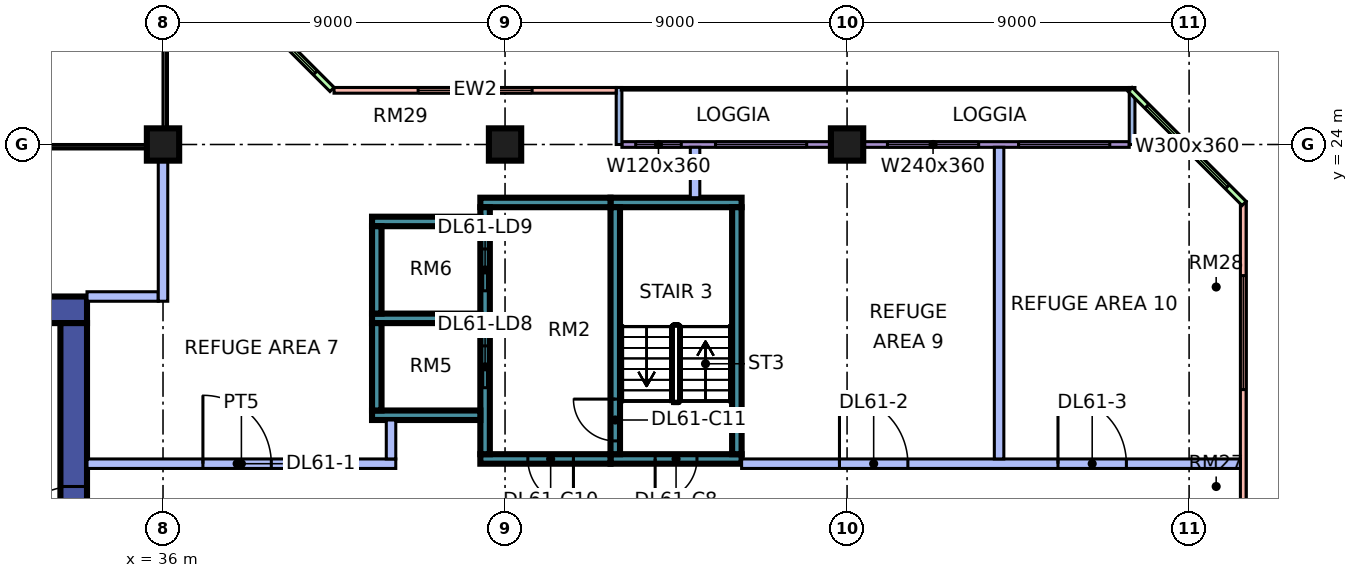
"""IFC4 building model, lengths in metres.
Left out: names, types, materials, properties, quantities, classifications, styles, units other than length and angle.
Written with IfcOpenShell. Run it as: python <this file> out.ifc"""

import sys

from ifc_helpers import new_model, si_unit, direction, frame, frame_2d, origin, origin_2d, place, context, subcontext, project, spatial, rectangle, extrude, element, fill, save


model = new_model("IFC4")
c1 = context("Model", 3, precision=1e-05, world=origin(), true_north=direction((0.0, 1.0)))
c2 = subcontext(c1, "Body", "Model", "MODEL_VIEW")
j1 = project(units=[si_unit("LENGTHUNIT", "METRE"), si_unit("PLANEANGLEUNIT", "RADIAN")], contexts=[c1])
p1 = place(None, origin())
s1 = spatial("IfcSite", under=j1, at=p1, CompositionType="ELEMENT")
p2 = place(p1, origin())
s2 = spatial("IfcBuilding", under=s1, at=p2, CompositionType="ELEMENT")
p3 = place(p2, frame((0.0, 0.0, 256.65)))
s3 = spatial("IfcBuildingStorey", under=s2, at=p3, CompositionType="ELEMENT", Elevation=256.65)
for number, where, z_axis, x_axis in (
    (1, (36.0, 24.0, 0.0), (0.0, 0.0, 1.0), (1.0, 0.0, 0.0)),
    (2, (45.0, 24.0, 0.0), (0.0, 0.0, 1.0), (1.0, 0.0, 0.0)),
    (3, (54.0, 24.0, 0.0), (0.0, 0.0, 1.0), (1.0, 0.0, 0.0)),
):
    element("IfcColumn", number, at=place(p3, frame(where, z_axis=z_axis, x_axis=x_axis)), inside=s3, PredefinedType="COLUMN", context=c2, shape_type="SweptSolid", body=[
        extrude(rectangle(XDim=0.85, YDim=0.85, at=origin_2d()), origin(), (0.0, 0.0, 1.0), 5.5),
    ])
p4 = place(p3, frame((9.0, 19.65, 0.0), z_axis=(0.0, 0.0, 1.0), x_axis=(1.0, 0.0, 0.0)))
e4 = element("IfcWall", 4, at=p4, inside=s3, PredefinedType="SHEAR", context=c2, shape_type="SweptSolid", body=[
    extrude(rectangle(XDim=25.0, YDim=0.7, at=frame_2d((12.5, 0.0))), origin(), (0.0, 0.0, 1.0), 5.5),
])
p5 = place(p4, frame((19.1, 0.0, 0.0)))
e5 = element("IfcOpeningElement", 5, at=p5, cuts=e4, PredefinedType="OPENING", context=c2, shape_type="SweptSolid", body=[
    extrude(rectangle(XDim=1.8, YDim=2.4, at=frame_2d((0.9, 1.2))), frame((0.0, 0.36, 0.0), z_axis=(0.0, -1.0, 0.0), x_axis=(1.0, 0.0, 0.0)), (0.0, 0.0, 1.0), 0.72),
])
p6 = place(p3, frame((33.65, 7.7, 0.0), z_axis=(0.0, 0.0, 1.0), x_axis=(0.0, 1.0, 0.0)))
e6 = element("IfcWall", 6, at=p6, inside=s3, PredefinedType="SHEAR", context=c2, shape_type="SweptSolid", body=[
    extrude(rectangle(XDim=11.6, YDim=0.7, at=frame_2d((5.8, 0.0))), origin(), (0.0, 0.0, 1.0), 5.5),
])
p7 = place(p6, frame((5.5, 0.0, 0.0)))
e7 = element("IfcOpeningElement", 7, at=p7, cuts=e6, PredefinedType="OPENING", context=c2, shape_type="SweptSolid", body=[
    extrude(rectangle(XDim=1.8, YDim=2.4, at=frame_2d((0.9, 1.2))), frame((0.0, 0.36, 0.0), z_axis=(0.0, -1.0, 0.0), x_axis=(1.0, 0.0, 0.0)), (0.0, 0.0, 1.0), 0.72),
])
p8 = place(p3, frame((47.775, 15.725, 0.0), z_axis=(0.0, 0.0, 1.0), x_axis=(1.0, 0.0, 0.0)))
e8 = element("IfcWall", 8, at=p8, inside=s3, PredefinedType="SHEAR", context=c2, shape_type="SweptSolid", body=[
    extrude(rectangle(XDim=3.45, YDim=0.25, at=frame_2d((1.725, 0.0))), origin(), (0.0, 0.0, 1.0), 5.5),
])
p9 = place(p8, frame((1.175, 0.0, 0.0)))
e9 = element("IfcOpeningElement", 9, at=p9, cuts=e8, PredefinedType="OPENING", context=c2, shape_type="SweptSolid", body=[
    extrude(rectangle(XDim=1.1, YDim=2.2, at=frame_2d((0.55, 1.1))), frame((0.0, 0.135, 0.0), z_axis=(0.0, -1.0, 0.0), x_axis=(1.0, 0.0, 0.0)), (0.0, 0.0, 1.0), 0.27),
])
p10 = place(p3, frame((47.775, 22.475, 0.0), z_axis=(0.0, 0.0, 1.0), x_axis=(1.0, 0.0, 0.0)))
e10 = element("IfcWall", 10, at=p10, inside=s3, PredefinedType="SHEAR", context=c2, shape_type="SweptSolid", body=[
    extrude(rectangle(XDim=3.45, YDim=0.25, at=frame_2d((1.725, 0.0))), origin(), (0.0, 0.0, 1.0), 5.5),
])
p11 = place(p3, frame((47.9, 15.85, 0.0), z_axis=(0.0, 0.0, 1.0), x_axis=(0.0, 1.0, 0.0)))
e11 = element("IfcWall", 11, at=p11, inside=s3, PredefinedType="SHEAR", context=c2, shape_type="SweptSolid", body=[
    extrude(rectangle(XDim=6.5, YDim=0.25, at=frame_2d((3.25, 0.0))), origin(), (0.0, 0.0, 1.0), 5.5),
])
p12 = place(p11, frame((0.35, 0.0, 0.0)))
e12 = element("IfcOpeningElement", 12, at=p12, cuts=e11, PredefinedType="OPENING", context=c2, shape_type="SweptSolid", body=[
    extrude(rectangle(XDim=1.1, YDim=2.2, at=frame_2d((0.55, 1.1))), frame((0.0, 0.135, 0.0), z_axis=(0.0, -1.0, 0.0), x_axis=(1.0, 0.0, 0.0)), (0.0, 0.0, 1.0), 0.27),
])
p13 = place(p3, frame((51.1, 15.85, 0.0), z_axis=(0.0, 0.0, 1.0), x_axis=(0.0, 1.0, 0.0)))
e13 = element("IfcWall", 13, at=p13, inside=s3, PredefinedType="SHEAR", context=c2, shape_type="SweptSolid", body=[
    extrude(rectangle(XDim=6.5, YDim=0.25, at=frame_2d((3.25, 0.0))), origin(), (0.0, 0.0, 1.0), 5.5),
])
p14 = place(p3, frame((44.35, 15.725, 0.0), z_axis=(0.0, 0.0, 1.0), x_axis=(1.0, 0.0, 0.0)))
e14 = element("IfcWall", 14, at=p14, inside=s3, PredefinedType="SHEAR", context=c2, shape_type="SweptSolid", body=[
    extrude(rectangle(XDim=3.425, YDim=0.25, at=frame_2d((1.712, 0.0))), origin(), (0.0, 0.0, 1.0), 5.5),
])
p15 = place(p14, frame((1.25, 0.0, 0.0)))
e15 = element("IfcOpeningElement", 15, at=p15, cuts=e14, PredefinedType="OPENING", context=c2, shape_type="SweptSolid", body=[
    extrude(rectangle(XDim=1.2, YDim=2.2, at=frame_2d((0.6, 1.1))), frame((0.0, 0.135, 0.0), z_axis=(0.0, -1.0, 0.0), x_axis=(1.0, 0.0, 0.0)), (0.0, 0.0, 1.0), 0.27),
])
p16 = place(p3, frame((44.35, 22.475, 0.0), z_axis=(0.0, 0.0, 1.0), x_axis=(1.0, 0.0, 0.0)))
e16 = element("IfcWall", 16, at=p16, inside=s3, PredefinedType="SHEAR", context=c2, shape_type="SweptSolid", body=[
    extrude(rectangle(XDim=3.425, YDim=0.25, at=frame_2d((1.712, 0.0))), origin(), (0.0, 0.0, 1.0), 5.5),
])
p17 = place(p3, frame((44.475, 15.85, 0.0), z_axis=(0.0, 0.0, 1.0), x_axis=(0.0, 1.0, 0.0)))
e17 = element("IfcWall", 17, at=p17, inside=s3, PredefinedType="SHEAR", context=c2, shape_type="SweptSolid", body=[
    extrude(rectangle(XDim=6.5, YDim=0.25, at=frame_2d((3.25, 0.0))), origin(), (0.0, 0.0, 1.0), 5.5),
])
p18 = place(p17, frame((1.75, 0.0, 0.0)))
e18 = element("IfcOpeningElement", 18, at=p18, cuts=e17, PredefinedType="OPENING", context=c2, shape_type="SweptSolid", body=[
    extrude(rectangle(XDim=1.1, YDim=2.2, at=frame_2d((0.55, 1.1))), frame((0.0, 0.135, 0.0), z_axis=(0.0, -1.0, 0.0), x_axis=(1.0, 0.0, 0.0)), (0.0, 0.0, 1.0), 0.27),
])
p19 = place(p17, frame((4.3, 0.0, 0.0)))
e19 = element("IfcOpeningElement", 19, at=p19, cuts=e17, PredefinedType="OPENING", context=c2, shape_type="SweptSolid", body=[
    extrude(rectangle(XDim=1.1, YDim=2.2, at=frame_2d((0.55, 1.1))), frame((0.0, 0.135, 0.0), z_axis=(0.0, -1.0, 0.0), x_axis=(1.0, 0.0, 0.0)), (0.0, 0.0, 1.0), 0.27),
])
for number, where, z_axis, x_axis in (
    (20, (41.5, 16.875, 0.0), (0.0, 0.0, 1.0), (1.0, 0.0, 0.0)),
    (21, (41.5, 19.425, 0.0), (0.0, 0.0, 1.0), (1.0, 0.0, 0.0)),
    (22, (41.5, 21.975, 0.0), (0.0, 0.0, 1.0), (1.0, 0.0, 0.0)),
):
    element("IfcWall", number, at=place(p3, frame(where, z_axis=z_axis, x_axis=x_axis)), inside=s3, PredefinedType="SHEAR", context=c2, shape_type="SweptSolid", body=[
        extrude(rectangle(XDim=2.85, YDim=0.25, at=frame_2d((1.425, 0.0))), origin(), (0.0, 0.0, 1.0), 5.5),
    ])
for number, where, z_axis, x_axis in (
    (23, (41.625, 17.0, 0.0), (0.0, 0.0, 1.0), (0.0, 1.0, 0.0)),
    (24, (41.625, 19.55, 0.0), (0.0, 0.0, 1.0), (0.0, 1.0, 0.0)),
):
    element("IfcWall", number, at=place(p3, frame(where, z_axis=z_axis, x_axis=x_axis)), inside=s3, PredefinedType="SHEAR", context=c2, shape_type="SweptSolid", body=[
        extrude(rectangle(XDim=2.3, YDim=0.25, at=frame_2d((1.15, 0.0))), origin(), (0.0, 0.0, 1.0), 5.5),
    ])
p20 = place(p3, frame((61.425, 24.0, 0.0), z_axis=(0.0, 0.0, 1.0), x_axis=(-1.0, 0.0, 0.0)))
e25 = element("IfcWall", 25, at=p20, inside=s3, PredefinedType="SOLIDWALL", context=c2, shape_type="SweptSolid", body=[
    extrude(rectangle(XDim=13.35, YDim=0.15, at=frame_2d((6.675, 0.0))), origin(), (0.0, 0.0, 1.0), 5.05),
])
p21 = place(p20, frame((0.512, 0.0, 0.45)))
e26 = element("IfcOpeningElement", 26, at=p21, cuts=e25, PredefinedType="OPENING", context=c2, shape_type="SweptSolid", body=[
    extrude(rectangle(XDim=2.4, YDim=3.6, at=frame_2d((1.2, 1.8))), frame((0.0, 0.085, 0.0), z_axis=(0.0, -1.0, 0.0), x_axis=(1.0, 0.0, 0.0)), (0.0, 0.0, 1.0), 0.17),
])
p22 = place(p20, frame((3.962, 0.0, 0.45)))
e27 = element("IfcOpeningElement", 27, at=p22, cuts=e25, PredefinedType="OPENING", context=c2, shape_type="SweptSolid", body=[
    extrude(rectangle(XDim=2.4, YDim=3.6, at=frame_2d((1.2, 1.8))), frame((0.0, 0.085, 0.0), z_axis=(0.0, -1.0, 0.0), x_axis=(1.0, 0.0, 0.0)), (0.0, 0.0, 1.0), 0.17),
])
p23 = place(p20, frame((8.488, 0.0, 0.45)))
e28 = element("IfcOpeningElement", 28, at=p23, cuts=e25, PredefinedType="OPENING", context=c2, shape_type="SweptSolid", body=[
    extrude(rectangle(XDim=2.4, YDim=3.6, at=frame_2d((1.2, 1.8))), frame((0.0, 0.085, 0.0), z_axis=(0.0, -1.0, 0.0), x_axis=(1.0, 0.0, 0.0)), (0.0, 0.0, 1.0), 0.17),
])
p24 = place(p20, frame((11.788, 0.0, 0.45)))
e29 = element("IfcOpeningElement", 29, at=p24, cuts=e25, PredefinedType="OPENING", context=c2, shape_type="SweptSolid", body=[
    extrude(rectangle(XDim=1.2, YDim=3.6, at=frame_2d((0.6, 1.8))), frame((0.0, 0.085, 0.0), z_axis=(0.0, -1.0, 0.0), x_axis=(1.0, 0.0, 0.0)), (0.0, 0.0, 1.0), 0.17),
])
for number, where, z_axis, x_axis in (
    (30, (61.5, 25.5, 0.0), (0.0, 0.0, 1.0), (0.0, -1.0, 0.0)),
    (31, (48.0, 25.5, 0.0), (0.0, 0.0, 1.0), (0.0, -1.0, 0.0)),
):
    element("IfcWall", number, at=place(p3, frame(where, z_axis=z_axis, x_axis=x_axis)), inside=s3, PredefinedType="SOLIDWALL", context=c2, shape_type="SweptSolid", body=[
        extrude(rectangle(XDim=1.5, YDim=0.15, at=frame_2d((0.75, 0.0))), origin(), (0.0, 0.0, 1.0), 5.05),
    ])
p25 = place(p3, frame((47.925, 25.425, 0.0), z_axis=(0.0, 0.0, 1.0), x_axis=(-1.0, 0.0, 0.0)))
e32 = element("IfcWall", 32, at=p25, inside=s3, PredefinedType="SOLIDWALL", context=c2, shape_type="SweptSolid", body=[
    extrude(rectangle(XDim=7.425, YDim=0.15, at=frame_2d((3.712, 0.0))), origin(), (0.0, 0.0, 1.0), 5.05),
])
p26 = place(p25, frame((2.212, 0.0, 0.45)))
e33 = element("IfcOpeningElement", 33, at=p26, cuts=e32, PredefinedType="OPENING", context=c2, shape_type="SweptSolid", body=[
    extrude(rectangle(XDim=3.0, YDim=3.6, at=frame_2d((1.5, 1.8))), frame((0.0, 0.085, 0.0), z_axis=(0.0, -1.0, 0.0), x_axis=(1.0, 0.0, 0.0)), (0.0, 0.0, 1.0), 0.17),
])
p27 = place(p3, frame((40.447, 25.447, 0.0), z_axis=(0.0, 0.0, 1.0), x_axis=(-0.707106781187, 0.707106781187, 0.0)))
e34 = element("IfcWall", 34, at=p27, inside=s3, PredefinedType="SOLIDWALL", context=c2, shape_type="SweptSolid", body=[
    extrude(rectangle(XDim=4.243, YDim=0.15, at=frame_2d((2.121, 0.0))), origin(), (0.0, 0.0, 1.0), 5.05),
])
p28 = place(p27, frame((0.621, 0.0, 0.45)))
e35 = element("IfcOpeningElement", 35, at=p28, cuts=e34, PredefinedType="OPENING", context=c2, shape_type="SweptSolid", body=[
    extrude(rectangle(XDim=3.0, YDim=3.6, at=frame_2d((1.5, 1.8))), frame((0.0, 0.085, 0.0), z_axis=(0.0, -1.0, 0.0), x_axis=(1.0, 0.0, 0.0)), (0.0, 0.0, 1.0), 0.17),
])
p29 = place(p3, frame((64.425, 12.075, 0.0), z_axis=(0.0, 0.0, 1.0), x_axis=(0.0, 1.0, 0.0)))
e36 = element("IfcWall", 36, at=p29, inside=s3, PredefinedType="SOLIDWALL", context=c2, shape_type="SweptSolid", body=[
    extrude(rectangle(XDim=10.425, YDim=0.15, at=frame_2d((5.212, 0.0))), origin(), (0.0, 0.0, 1.0), 5.05),
])
p30 = place(p29, frame((5.475, 0.0, 0.45)))
e37 = element("IfcOpeningElement", 37, at=p30, cuts=e36, PredefinedType="OPENING", context=c2, shape_type="SweptSolid", body=[
    extrude(rectangle(XDim=3.0, YDim=3.6, at=frame_2d((1.5, 1.8))), frame((0.0, 0.085, 0.0), z_axis=(0.0, -1.0, 0.0), x_axis=(1.0, 0.0, 0.0)), (0.0, 0.0, 1.0), 0.17),
])
p31 = place(p3, frame((64.447, 22.447, 0.0), z_axis=(0.0, 0.0, 1.0), x_axis=(-0.707106781187, 0.707106781187, 0.0)))
e38 = element("IfcWall", 38, at=p31, inside=s3, PredefinedType="SOLIDWALL", context=c2, shape_type="SweptSolid", body=[
    extrude(rectangle(XDim=4.243, YDim=0.15, at=frame_2d((2.121, 0.0))), origin(), (0.0, 0.0, 1.0), 5.05),
])
p32 = place(p31, frame((0.621, 0.0, 0.45)))
e39 = element("IfcOpeningElement", 39, at=p32, cuts=e38, PredefinedType="OPENING", context=c2, shape_type="SweptSolid", body=[
    extrude(rectangle(XDim=3.0, YDim=3.6, at=frame_2d((1.5, 1.8))), frame((0.0, 0.085, 0.0), z_axis=(0.0, -1.0, 0.0), x_axis=(1.0, 0.0, 0.0)), (0.0, 0.0, 1.0), 0.17),
])
p33 = place(p3, frame((34.0, 15.6, 0.0), z_axis=(0.0, 0.0, 1.0), x_axis=(1.0, 0.0, 0.0)))
e40 = element("IfcWall", 40, at=p33, inside=s3, PredefinedType="PARTITIONING", context=c2, shape_type="SweptSolid", body=[
    extrude(rectangle(XDim=8.125, YDim=0.25, at=frame_2d((4.062, 0.0))), origin(), (0.0, 0.0, 1.0), 5.05),
])
p34 = place(p33, frame((3.05, 0.0, 0.0)))
e41 = element("IfcOpeningElement", 41, at=p34, cuts=e40, PredefinedType="OPENING", context=c2, shape_type="SweptSolid", body=[
    extrude(rectangle(XDim=1.8, YDim=2.1, at=frame_2d((0.9, 1.05))), frame((0.0, 0.135, 0.0), z_axis=(0.0, -1.0, 0.0), x_axis=(1.0, 0.0, 0.0)), (0.0, 0.0, 1.0), 0.27),
])
p35 = place(p3, frame((34.0, 20.0, 0.0), z_axis=(0.0, 0.0, 1.0), x_axis=(1.0, 0.0, 0.0)))
e42 = element("IfcWall", 42, at=p35, inside=s3, PredefinedType="PARTITIONING", context=c2, shape_type="SweptSolid", body=[
    extrude(rectangle(XDim=1.875, YDim=0.25, at=frame_2d((0.938, 0.0))), origin(), (0.0, 0.0, 1.0), 5.05),
])
p36 = place(p3, frame((36.0, 19.875, 0.0), z_axis=(0.0, 0.0, 1.0), x_axis=(0.0, 1.0, 0.0)))
e43 = element("IfcWall", 43, at=p36, inside=s3, PredefinedType="PARTITIONING", context=c2, shape_type="SweptSolid", body=[
    extrude(rectangle(XDim=4.125, YDim=0.25, at=frame_2d((2.062, 0.0))), origin(), (0.0, 0.0, 1.0), 5.05),
])
p37 = place(p3, frame((42.0, 15.725, 0.0), z_axis=(0.0, 0.0, 1.0), x_axis=(0.0, 1.0, 0.0)))
e44 = element("IfcWall", 44, at=p37, inside=s3, PredefinedType="PARTITIONING", context=c2, shape_type="SweptSolid", body=[
    extrude(rectangle(XDim=1.025, YDim=0.25, at=frame_2d((0.512, 0.0))), origin(), (0.0, 0.0, 1.0), 5.05),
])
p38 = place(p3, frame((50.0, 22.6, 0.0), z_axis=(0.0, 0.0, 1.0), x_axis=(0.0, 1.0, 0.0)))
e45 = element("IfcWall", 45, at=p38, inside=s3, PredefinedType="PARTITIONING", context=c2, shape_type="SweptSolid", body=[
    extrude(rectangle(XDim=1.326, YDim=0.25, at=frame_2d((0.663, 0.0))), origin(), (0.0, 0.0, 1.0), 5.05),
])
p39 = place(p3, frame((51.225, 15.6, 0.0), z_axis=(0.0, 0.0, 1.0), x_axis=(1.0, 0.0, 0.0)))
e46 = element("IfcWall", 46, at=p39, inside=s3, PredefinedType="PARTITIONING", context=c2, shape_type="SweptSolid", body=[
    extrude(rectangle(XDim=13.125, YDim=0.25, at=frame_2d((6.562, 0.0))), origin(), (0.0, 0.0, 1.0), 5.05),
])
p40 = place(p39, frame((2.575, 0.0, 0.0)))
e47 = element("IfcOpeningElement", 47, at=p40, cuts=e46, PredefinedType="OPENING", context=c2, shape_type="SweptSolid", body=[
    extrude(rectangle(XDim=1.8, YDim=2.1, at=frame_2d((0.9, 1.05))), frame((0.0, 0.135, 0.0), z_axis=(0.0, -1.0, 0.0), x_axis=(1.0, 0.0, 0.0)), (0.0, 0.0, 1.0), 0.27),
])
p41 = place(p39, frame((8.325, 0.0, 0.0)))
e48 = element("IfcOpeningElement", 48, at=p41, cuts=e46, PredefinedType="OPENING", context=c2, shape_type="SweptSolid", body=[
    extrude(rectangle(XDim=1.8, YDim=2.1, at=frame_2d((0.9, 1.05))), frame((0.0, 0.135, 0.0), z_axis=(0.0, -1.0, 0.0), x_axis=(1.0, 0.0, 0.0)), (0.0, 0.0, 1.0), 0.27),
])
p42 = place(p3, frame((58.0, 15.725, 0.0), z_axis=(0.0, 0.0, 1.0), x_axis=(0.0, 1.0, 0.0)))
e49 = element("IfcWall", 49, at=p42, inside=s3, PredefinedType="PARTITIONING", context=c2, shape_type="SweptSolid", body=[
    extrude(rectangle(XDim=8.201, YDim=0.25, at=frame_2d((4.101, 0.0))), origin(), (0.0, 0.0, 1.0), 5.05),
])
p43 = place(p21, origin())
e50 = element("IfcWindow", 50, at=p43, inside=s3, PartitioningType="SINGLE_PANEL", PredefinedType="WINDOW", context=c2, shape_type="SweptSolid", body=[
    extrude(rectangle(XDim=2.4, YDim=3.6, at=frame_2d((1.2, 1.8))), frame((0.0, 0.03, 0.0), z_axis=(0.0, -1.0, 0.0), x_axis=(1.0, 0.0, 0.0)), (0.0, 0.0, 1.0), 0.06),
])
fill(e26, e50)
p44 = place(p22, origin())
e51 = element("IfcWindow", 51, at=p44, inside=s3, PartitioningType="SINGLE_PANEL", PredefinedType="WINDOW", context=c2, shape_type="SweptSolid", body=[
    extrude(rectangle(XDim=2.4, YDim=3.6, at=frame_2d((1.2, 1.8))), frame((0.0, 0.03, 0.0), z_axis=(0.0, -1.0, 0.0), x_axis=(1.0, 0.0, 0.0)), (0.0, 0.0, 1.0), 0.06),
])
fill(e27, e51)
p45 = place(p23, origin())
e52 = element("IfcWindow", 52, at=p45, inside=s3, PartitioningType="SINGLE_PANEL", PredefinedType="WINDOW", context=c2, shape_type="SweptSolid", body=[
    extrude(rectangle(XDim=2.4, YDim=3.6, at=frame_2d((1.2, 1.8))), frame((0.0, 0.03, 0.0), z_axis=(0.0, -1.0, 0.0), x_axis=(1.0, 0.0, 0.0)), (0.0, 0.0, 1.0), 0.06),
])
fill(e28, e52)
p46 = place(p24, origin())
e53 = element("IfcWindow", 53, at=p46, inside=s3, PartitioningType="SINGLE_PANEL", PredefinedType="WINDOW", context=c2, shape_type="SweptSolid", body=[
    extrude(rectangle(XDim=1.2, YDim=3.6, at=frame_2d((0.6, 1.8))), frame((0.0, 0.03, 0.0), z_axis=(0.0, -1.0, 0.0), x_axis=(1.0, 0.0, 0.0)), (0.0, 0.0, 1.0), 0.06),
])
fill(e29, e53)
p47 = place(p26, origin())
e54 = element("IfcWindow", 54, at=p47, inside=s3, PartitioningType="SINGLE_PANEL", PredefinedType="WINDOW", context=c2, shape_type="SweptSolid", body=[
    extrude(rectangle(XDim=3.0, YDim=3.6, at=frame_2d((1.5, 1.8))), frame((0.0, 0.03, 0.0), z_axis=(0.0, -1.0, 0.0), x_axis=(1.0, 0.0, 0.0)), (0.0, 0.0, 1.0), 0.06),
])
fill(e33, e54)
p48 = place(p28, origin())
e55 = element("IfcWindow", 55, at=p48, inside=s3, PartitioningType="SINGLE_PANEL", PredefinedType="WINDOW", context=c2, shape_type="SweptSolid", body=[
    extrude(rectangle(XDim=3.0, YDim=3.6, at=frame_2d((1.5, 1.8))), frame((0.0, 0.03, 0.0), z_axis=(0.0, -1.0, 0.0), x_axis=(1.0, 0.0, 0.0)), (0.0, 0.0, 1.0), 0.06),
])
fill(e35, e55)
p49 = place(p30, origin())
e56 = element("IfcWindow", 56, at=p49, inside=s3, PartitioningType="SINGLE_PANEL", PredefinedType="WINDOW", context=c2, shape_type="SweptSolid", body=[
    extrude(rectangle(XDim=3.0, YDim=3.6, at=frame_2d((1.5, 1.8))), frame((0.0, 0.03, 0.0), z_axis=(0.0, -1.0, 0.0), x_axis=(1.0, 0.0, 0.0)), (0.0, 0.0, 1.0), 0.06),
])
fill(e37, e56)
p50 = place(p32, origin())
e57 = element("IfcWindow", 57, at=p50, inside=s3, PartitioningType="SINGLE_PANEL", PredefinedType="WINDOW", context=c2, shape_type="SweptSolid", body=[
    extrude(rectangle(XDim=3.0, YDim=3.6, at=frame_2d((1.5, 1.8))), frame((0.0, 0.03, 0.0), z_axis=(0.0, -1.0, 0.0), x_axis=(1.0, 0.0, 0.0)), (0.0, 0.0, 1.0), 0.06),
])
fill(e39, e57)
p51 = place(p7, origin())
e58 = element("IfcDoor", 58, at=p51, inside=s3, OperationType="DOUBLE_DOOR_SINGLE_SWING", PredefinedType="DOOR", context=c2, shape_type="SweptSolid", body=[
    extrude(rectangle(XDim=1.8, YDim=2.4, at=frame_2d((0.9, 1.2))), frame((0.0, 0.025, 0.0), z_axis=(0.0, -1.0, 0.0), x_axis=(1.0, 0.0, 0.0)), (0.0, 0.0, 1.0), 0.05),
])
fill(e7, e58)
p52 = place(p9, frame((1.1, 0.0, 0.0), z_axis=(0.0, 0.0, 1.0), x_axis=(-1.0, 0.0, 0.0)))
e59 = element("IfcDoor", 59, at=p52, inside=s3, OperationType="SINGLE_SWING_LEFT", PredefinedType="DOOR", context=c2, shape_type="SweptSolid", body=[
    extrude(rectangle(XDim=1.1, YDim=2.2, at=frame_2d((0.55, 1.1))), frame((0.0, 0.025, 0.0), z_axis=(0.0, -1.0, 0.0), x_axis=(1.0, 0.0, 0.0)), (0.0, 0.0, 1.0), 0.05),
])
fill(e9, e59)
p53 = place(p15, origin())
e60 = element("IfcDoor", 60, at=p53, inside=s3, OperationType="SINGLE_SWING_RIGHT", PredefinedType="DOOR", context=c2, shape_type="SweptSolid", body=[
    extrude(rectangle(XDim=1.2, YDim=2.2, at=frame_2d((0.6, 1.1))), frame((0.0, 0.025, 0.0), z_axis=(0.0, -1.0, 0.0), x_axis=(1.0, 0.0, 0.0)), (0.0, 0.0, 1.0), 0.05),
])
fill(e15, e60)
p54 = place(p12, frame((1.1, 0.0, 0.0), z_axis=(0.0, 0.0, 1.0), x_axis=(-1.0, 0.0, 0.0)))
e61 = element("IfcDoor", 61, at=p54, inside=s3, OperationType="SINGLE_SWING_RIGHT", PredefinedType="DOOR", context=c2, shape_type="SweptSolid", body=[
    extrude(rectangle(XDim=1.1, YDim=2.2, at=frame_2d((0.55, 1.1))), frame((0.0, 0.025, 0.0), z_axis=(0.0, -1.0, 0.0), x_axis=(1.0, 0.0, 0.0)), (0.0, 0.0, 1.0), 0.05),
])
fill(e12, e61)
p55 = place(p18, origin())
e62 = element("IfcDoor", 62, at=p55, inside=s3, OperationType="DOUBLE_DOOR_SLIDING", PredefinedType="DOOR", context=c2, shape_type="SweptSolid", body=[
    extrude(rectangle(XDim=1.1, YDim=2.2, at=frame_2d((0.55, 1.1))), frame((0.0, 0.025, 0.0), z_axis=(0.0, -1.0, 0.0), x_axis=(1.0, 0.0, 0.0)), (0.0, 0.0, 1.0), 0.05),
])
fill(e18, e62)
p56 = place(p19, origin())
e63 = element("IfcDoor", 63, at=p56, inside=s3, OperationType="DOUBLE_DOOR_SLIDING", PredefinedType="DOOR", context=c2, shape_type="SweptSolid", body=[
    extrude(rectangle(XDim=1.1, YDim=2.2, at=frame_2d((0.55, 1.1))), frame((0.0, 0.025, 0.0), z_axis=(0.0, -1.0, 0.0), x_axis=(1.0, 0.0, 0.0)), (0.0, 0.0, 1.0), 0.05),
])
fill(e19, e63)
p57 = place(p34, origin())
e64 = element("IfcDoor", 64, at=p57, inside=s3, OperationType="DOUBLE_DOOR_SINGLE_SWING", PredefinedType="DOOR", context=c2, shape_type="SweptSolid", body=[
    extrude(rectangle(XDim=1.8, YDim=2.1, at=frame_2d((0.9, 1.05))), frame((0.0, 0.025, 0.0), z_axis=(0.0, -1.0, 0.0), x_axis=(1.0, 0.0, 0.0)), (0.0, 0.0, 1.0), 0.05),
])
fill(e41, e64)
p58 = place(p40, origin())
e65 = element("IfcDoor", 65, at=p58, inside=s3, OperationType="DOUBLE_DOOR_SINGLE_SWING", PredefinedType="DOOR", context=c2, shape_type="SweptSolid", body=[
    extrude(rectangle(XDim=1.8, YDim=2.1, at=frame_2d((0.9, 1.05))), frame((0.0, 0.025, 0.0), z_axis=(0.0, -1.0, 0.0), x_axis=(1.0, 0.0, 0.0)), (0.0, 0.0, 1.0), 0.05),
])
fill(e47, e65)
p59 = place(p41, origin())
e66 = element("IfcDoor", 66, at=p59, inside=s3, OperationType="DOUBLE_DOOR_SINGLE_SWING", PredefinedType="DOOR", context=c2, shape_type="SweptSolid", body=[
    extrude(rectangle(XDim=1.8, YDim=2.1, at=frame_2d((0.9, 1.05))), frame((0.0, 0.025, 0.0), z_axis=(0.0, -1.0, 0.0), x_axis=(1.0, 0.0, 0.0)), (0.0, 0.0, 1.0), 0.05),
])
fill(e48, e66)
save(model, sys.argv[1])
